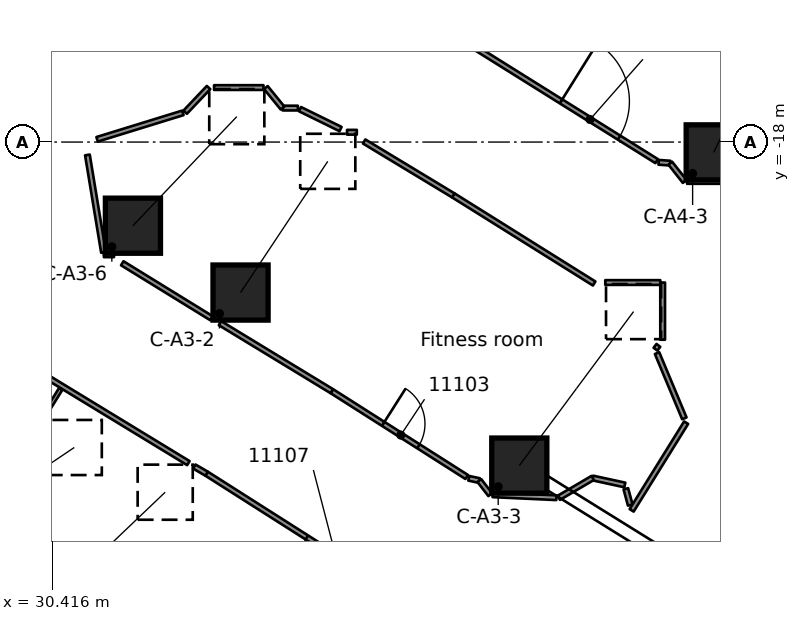
"""IFC4 building model, lengths in metres.
Left out: names, types, materials, properties, quantities, classifications, styles, units other than length and angle.
Written with IfcOpenShell. Run it as: python <this file> out.ifc"""

import sys

from ifc_helpers import new_model, si_unit, direction, frame, frame_2d, origin, origin_2d, place, context, subcontext, project, spatial, rectangle, extrude, element, fill, save


model = new_model("IFC4")
c1 = context("Model", 3, precision=1e-05, world=origin(), true_north=direction((0.0, 1.0)))
c2 = subcontext(c1, "Body", "Model", "MODEL_VIEW")
j1 = project(units=[si_unit("LENGTHUNIT", "METRE"), si_unit("PLANEANGLEUNIT", "RADIAN")], contexts=[c1])
p1 = place(None, origin())
s1 = spatial("IfcSite", under=j1, at=p1, CompositionType="ELEMENT")
p2 = place(p1, origin())
s2 = spatial("IfcBuilding", under=s1, at=p2, CompositionType="ELEMENT")
p3 = place(p2, frame((0.0, 0.0, 54.8)))
s3 = spatial("IfcBuildingStorey", under=s2, at=p3, CompositionType="ELEMENT", Elevation=54.8)
p4 = place(p3, frame((30.255, -30.2, 0.61), z_axis=(0.608996447685, 0.580618057931, 0.540375792862), x_axis=(-0.690042356189, 0.723768987084, 0.0)))
e1 = element("IfcColumn", 1, at=p4, inside=s3, PredefinedType="COLUMN", context=c2, shape_type="SweptSolid", body=[
    extrude(rectangle(XDim=1.45, YDim=1.45, at=origin_2d()), origin(), (0.0, 0.0, 1.0), 5.145),
])
p5 = place(p3, frame((27.423, -28.442, 0.609), z_axis=(0.69676588464, 0.469082356893, 0.542659234192), x_axis=(-0.558462658867, 0.829529661104, 0.0)))
e2 = element("IfcColumn", 2, at=p5, inside=s3, PredefinedType="COLUMN", context=c2, shape_type="SweptSolid", body=[
    extrude(rectangle(XDim=1.45, YDim=1.45, at=origin_2d()), origin(), (0.0, 0.0, 1.0), 5.126),
])
p6 = place(p3, frame((35.371, -21.96, 0.601), z_axis=(0.458815633404, 0.690322287577, 0.559413401536), x_axis=(-0.832828584318, 0.553530983002, 0.0)))
e3 = element("IfcColumn", 3, at=p6, inside=s3, PredefinedType="COLUMN", context=c2, shape_type="SweptSolid", body=[
    extrude(rectangle(XDim=1.45, YDim=1.45, at=origin_2d()), origin(), (0.0, 0.0, 1.0), 5.002),
])
p7 = place(p3, frame((42.706, -26.513, 0.638), z_axis=(0.52437230605, 0.706642348451, 0.475068706635), x_axis=(-0.803049477983, 0.595912355898, 0.0)))
e4 = element("IfcColumn", 4, at=p7, inside=s3, PredefinedType="COLUMN", context=c2, shape_type="SweptSolid", body=[
    extrude(rectangle(XDim=1.45, YDim=1.45, at=origin_2d()), origin(), (0.0, 0.0, 1.0), 5.734),
])
p8 = place(p3, frame((32.539, -20.201, 0.591), z_axis=(0.561988017013, 0.590152683579, 0.579559555869), x_axis=(-0.724176021498, 0.689615175215, 0.0)))
e5 = element("IfcColumn", 5, at=p8, inside=s3, PredefinedType="COLUMN", context=c2, shape_type="SweptSolid", body=[
    extrude(rectangle(XDim=1.45, YDim=1.45, at=origin_2d()), origin(), (0.0, 0.0, 1.0), 4.863),
])
p9 = place(p3, frame((47.822, -18.272, 0.637), z_axis=(0.380217041429, 0.791847782589, 0.47792477506), x_axis=(-0.901465266599, 0.432851444626, 0.0)))
e6 = element("IfcColumn", 6, at=p9, inside=s3, PredefinedType="COLUMN", context=c2, shape_type="SweptSolid", body=[
    extrude(rectangle(XDim=1.45, YDim=1.45, at=origin_2d()), origin(), (0.0, 0.0, 1.0), 5.705),
])
p10 = place(p3, frame((31.341, -18.339, 0.0), z_axis=(0.0, 0.0, 1.0), x_axis=(0.163028246139, -0.986621402039, 0.0)))
e7 = element("IfcWall", 7, at=p10, inside=s3, PredefinedType="PARTITIONING", context=c2, shape_type="SweptSolid", body=[
    extrude(rectangle(XDim=2.6, YDim=0.125, at=frame_2d((1.3, 0.0))), origin(), (0.0, 0.0, 1.0), 3.58),
])
p11 = place(p3, frame((45.51, -27.123, 0.0), z_axis=(0.0, 0.0, 1.0), x_axis=(0.259479518398, -0.96574861094, 0.0)))
e8 = element("IfcWall", 8, at=p11, inside=s3, PredefinedType="PARTITIONING", context=c2, shape_type="SweptSolid", body=[
    extrude(rectangle(XDim=0.443, YDim=0.125, at=frame_2d((0.222, 0.0))), origin(), (0.0, 0.0, 1.0), 3.58),
])
p12 = place(p3, frame((46.331, -23.553, 0.0), z_axis=(0.0, 0.0, 1.0), x_axis=(0.385798010162, -0.922583272857, 0.0)))
e9 = element("IfcWall", 9, at=p12, inside=s3, PredefinedType="PARTITIONING", context=c2, shape_type="SweptSolid", body=[
    extrude(rectangle(XDim=1.861, YDim=0.125, at=frame_2d((0.931, 0.0))), origin(), (0.0, 0.0, 1.0), 3.58),
])
p13 = place(p3, frame((39.932, -30.195, 0.0), z_axis=(0.0, 0.0, 1.0), x_axis=(-0.843820070804, 0.536626208927, 0.0)))
e10 = element("IfcWall", 10, at=p13, inside=s3, PredefinedType="PARTITIONING", context=c2, shape_type="SweptSolid", body=[
    extrude(rectangle(XDim=6.464, YDim=0.125, at=frame_2d((3.232, 0.0))), origin(), (0.0, 0.0, 1.0), 3.58),
])
p14 = place(p13, frame((1.538, 0.0, 0.0)))
e11 = element("IfcOpeningElement", 11, at=p14, cuts=e10, PredefinedType="OPENING", context=c2, shape_type="SweptSolid", body=[
    extrude(rectangle(XDim=1.8, YDim=2.1, at=frame_2d((0.9, 1.05))), frame((0.0, 0.073, 0.0), z_axis=(0.0, -1.0, 0.0), x_axis=(1.0, 0.0, 0.0)), (0.0, 0.0, 1.0), 0.145),
])
p15 = place(p3, frame((37.774, -24.556, 0.0), z_axis=(0.0, 0.0, 1.0), x_axis=(0.843747538383, -0.53674024581, 0.0)))
e12 = element("IfcWall", 12, at=p15, inside=s3, PredefinedType="PARTITIONING", context=c2, shape_type="SweptSolid", body=[
    extrude(rectangle(XDim=4.205, YDim=0.125, at=frame_2d((2.103, 0.0))), origin(), (0.0, 0.0, 1.0), 3.58),
])
p16 = place(p15, frame((1.6, 0.0, 0.0)))
e13 = element("IfcOpeningElement", 13, at=p16, cuts=e12, PredefinedType="OPENING", context=c2, shape_type="SweptSolid", body=[
    extrude(rectangle(XDim=1.1, YDim=2.1, at=frame_2d((0.55, 1.05))), frame((0.0, 0.073, 0.0), z_axis=(0.0, -1.0, 0.0), x_axis=(1.0, 0.0, 0.0)), (0.0, 0.0, 1.0), 0.145),
])
p17 = place(p3, frame((37.774, -24.556, 0.0), z_axis=(0.0, 0.0, 1.0), x_axis=(-0.854394223193, 0.519625356747, 0.0)))
e14 = element("IfcWall", 14, at=p17, inside=s3, PredefinedType="PARTITIONING", context=c2, shape_type="SweptSolid", body=[
    extrude(rectangle(XDim=3.444, YDim=0.125, at=frame_2d((1.722, 0.0))), origin(), (0.0, 0.0, 1.0), 3.58),
])
p18 = place(p3, frame((40.972, -19.405, 0.0), z_axis=(0.0, 0.0, 1.0), x_axis=(-0.8557851023, 0.517331478534, 0.0)))
e15 = element("IfcWall", 15, at=p18, inside=s3, PredefinedType="PARTITIONING", context=c2, shape_type="SweptSolid", body=[
    extrude(rectangle(XDim=2.745, YDim=0.125, at=frame_2d((1.372, 0.0))), origin(), (0.0, 0.0, 1.0), 3.58),
])
p19 = place(p3, frame((40.972, -19.405, 0.0), z_axis=(0.0, 0.0, 1.0), x_axis=(0.847809891227, -0.530300281291, 0.0)))
e16 = element("IfcWall", 16, at=p19, inside=s3, PredefinedType="PARTITIONING", context=c2, shape_type="SweptSolid", body=[
    extrude(rectangle(XDim=4.369, YDim=0.125, at=frame_2d((2.185, 0.0))), origin(), (0.0, 0.0, 1.0), 3.58),
])
p20 = place(p3, frame((40.567, -14.906, 0.0), z_axis=(0.0, 0.0, 1.0), x_axis=(0.847984152338, -0.530021581998, 0.0)))
e17 = element("IfcWall", 17, at=p20, inside=s3, PredefinedType="PARTITIONING", context=c2, shape_type="SweptSolid", body=[
    extrude(rectangle(XDim=6.784, YDim=0.125, at=frame_2d((3.392, 0.0))), origin(), (0.0, 0.0, 1.0), 3.58),
])
p21 = place(p20, frame((3.817, 0.0, 0.0)))
e18 = element("IfcOpeningElement", 18, at=p21, cuts=e17, PredefinedType="OPENING", context=c2, shape_type="SweptSolid", body=[
    extrude(rectangle(XDim=1.8, YDim=2.1, at=frame_2d((0.9, 1.05))), frame((0.0, 0.073, 0.0), z_axis=(0.0, -1.0, 0.0), x_axis=(1.0, 0.0, 0.0)), (0.0, 0.0, 1.0), 0.145),
])
p22 = place(p3, frame((28.958, -23.379, 0.0), z_axis=(0.0, 0.0, 1.0), x_axis=(0.85410506727, -0.52010050381, 0.0)))
e19 = element("IfcWall", 19, at=p22, inside=s3, PredefinedType="PARTITIONING", context=c2, shape_type="SweptSolid", body=[
    extrude(rectangle(XDim=5.901, YDim=0.125, at=frame_2d((2.95, 0.0))), origin(), (0.0, 0.0, 1.0), 3.58),
])
p23 = place(p3, frame((32.258, -21.189, 0.0), z_axis=(0.0, 0.0, 1.0), x_axis=(0.851466744889, -0.524408602473, 0.0)))
e20 = element("IfcWall", 20, at=p23, inside=s3, PredefinedType="PARTITIONING", context=c2, shape_type="SweptSolid", body=[
    extrude(rectangle(XDim=2.758, YDim=0.125, at=frame_2d((1.379, 0.0))), origin(), (0.0, 0.0, 1.0), 3.58),
])
p24 = place(p3, frame((34.153, -26.538, 0.0), z_axis=(0.0, 0.0, 1.0), x_axis=(0.864934993762, -0.501883907458, 0.0)))
e21 = element("IfcWall", 21, at=p24, inside=s3, PredefinedType="PARTITIONING", context=c2, shape_type="SweptSolid", body=[
    extrude(rectangle(XDim=0.375, YDim=0.125, at=frame_2d((0.187, 0.0))), origin(), (0.0, 0.0, 1.0), 3.58),
])
p25 = place(p3, frame((36.935, -17.134, 0.0), z_axis=(0.0, 0.0, 1.0), x_axis=(0.897608509631, -0.440793561022, 0.0)))
e22 = element("IfcWall", 22, at=p25, inside=s3, PredefinedType="PARTITIONING", context=c2, shape_type="SweptSolid", body=[
    extrude(rectangle(XDim=1.188, YDim=0.125, at=frame_2d((0.594, 0.0))), origin(), (0.0, 0.0, 1.0), 3.58),
])
p26 = place(p3, frame((44.636, -26.839, 0.0), z_axis=(0.0, 0.0, 1.0), x_axis=(0.977242421198, -0.212125552944, 0.0)))
e23 = element("IfcWall", 23, at=p26, inside=s3, PredefinedType="PARTITIONING", context=c2, shape_type="SweptSolid", body=[
    extrude(rectangle(XDim=0.867, YDim=0.125, at=frame_2d((0.433, 0.0))), origin(), (0.0, 0.0, 1.0), 3.58),
])
p27 = place(p3, frame((43.683, -27.358, 0.0), z_axis=(0.0, 0.0, 1.0), x_axis=(-0.998952909466, 0.045750242292, 0.0)))
e24 = element("IfcWall", 24, at=p27, inside=s3, PredefinedType="PARTITIONING", context=c2, shape_type="SweptSolid", body=[
    extrude(rectangle(XDim=1.681, YDim=0.125, at=frame_2d((0.84, 0.0))), origin(), (0.0, 0.0, 1.0), 3.58),
])
p28 = place(p3, frame((41.377, -26.847, 0.0), z_axis=(0.0, 0.0, 1.0), x_axis=(0.977308287744, -0.211821884392, 0.0)))
e25 = element("IfcWall", 25, at=p28, inside=s3, PredefinedType="PARTITIONING", context=c2, shape_type="SweptSolid", body=[
    extrude(rectangle(XDim=0.283, YDim=0.125, at=frame_2d((0.142, 0.0))), origin(), (0.0, 0.0, 1.0), 3.58),
])
p29 = place(p3, frame((46.372, -18.533, 0.0), z_axis=(0.0, 0.0, 1.0), x_axis=(0.99743033576, -0.071643040877, 0.0)))
e26 = element("IfcWall", 26, at=p29, inside=s3, PredefinedType="PARTITIONING", context=c2, shape_type="SweptSolid", body=[
    extrude(rectangle(XDim=0.307, YDim=0.125, at=frame_2d((0.153, 0.0))), origin(), (0.0, 0.0, 1.0), 3.58),
])
p30 = place(p3, frame((44.968, -21.696, 0.0), z_axis=(0.0, 0.0, 1.0), x_axis=(1.0, 0.0, 0.0)))
e27 = element("IfcWall", 27, at=p30, inside=s3, PredefinedType="PARTITIONING", context=c2, shape_type="SweptSolid", body=[
    extrude(rectangle(XDim=1.448, YDim=0.125, at=frame_2d((0.724, 0.0))), origin(), (0.0, 0.0, 1.0), 3.58),
])
p31 = place(p3, frame((31.775, -20.966, 0.0), z_axis=(0.0, 0.0, 1.0), x_axis=(1.0, 0.0, 0.0)))
e28 = element("IfcWall", 28, at=p31, inside=s3, PredefinedType="PARTITIONING", context=c2, shape_type="SweptSolid", body=[
    extrude(rectangle(XDim=0.265, YDim=0.125, at=frame_2d((0.133, 0.0))), origin(), (0.0, 0.0, 1.0), 3.58),
])
p32 = place(p3, frame((47.12, -19.036, 0.0), z_axis=(0.0, 0.0, 1.0), x_axis=(1.0, 0.0, 0.0)))
e29 = element("IfcWall", 29, at=p32, inside=s3, PredefinedType="PARTITIONING", context=c2, shape_type="SweptSolid", body=[
    extrude(rectangle(XDim=1.905, YDim=0.125, at=frame_2d((0.952, 0.0))), origin(), (0.0, 0.0, 1.0), 3.58),
])
p33 = place(p3, frame((38.173, -17.742, 0.0), z_axis=(0.0, 0.0, 1.0), x_axis=(1.0, 0.0, 0.0)))
e30 = element("IfcWall", 30, at=p33, inside=s3, PredefinedType="PARTITIONING", context=c2, shape_type="SweptSolid", body=[
    extrude(rectangle(XDim=0.257, YDim=0.125, at=frame_2d((0.128, 0.0))), origin(), (0.0, 0.0, 1.0), 3.58),
])
p34 = place(p3, frame((36.477, -17.106, 0.0), z_axis=(0.0, 0.0, 1.0), x_axis=(1.0, 0.0, 0.0)))
e31 = element("IfcWall", 31, at=p34, inside=s3, PredefinedType="PARTITIONING", context=c2, shape_type="SweptSolid", body=[
    extrude(rectangle(XDim=0.402, YDim=0.125, at=frame_2d((0.201, 0.0))), origin(), (0.0, 0.0, 1.0), 3.58),
])
p35 = place(p3, frame((34.674, -16.566, 0.0), z_axis=(0.0, 0.0, 1.0), x_axis=(1.0, 0.0, 0.0)))
e32 = element("IfcWall", 32, at=p35, inside=s3, PredefinedType="PARTITIONING", context=c2, shape_type="SweptSolid", body=[
    extrude(rectangle(XDim=1.3, YDim=0.125, at=frame_2d((0.65, 0.0))), origin(), (0.0, 0.0, 1.0), 3.58),
])
p36 = place(p3, frame((31.596, -17.928, 0.0), z_axis=(0.0, 0.0, 1.0), x_axis=(0.95559332345, 0.294688649557, 0.0)))
e33 = element("IfcWall", 33, at=p36, inside=s3, PredefinedType="PARTITIONING", context=c2, shape_type="SweptSolid", body=[
    extrude(rectangle(XDim=2.362, YDim=0.125, at=frame_2d((1.181, 0.0))), origin(), (0.0, 0.0, 1.0), 3.58),
])
p37 = place(p3, frame((26.679, -15.675, 0.0), z_axis=(0.0, 0.0, 1.0), x_axis=(0.955672893263, 0.294430502974, 0.0)))
e34 = element("IfcWall", 34, at=p37, inside=s3, PredefinedType="PARTITIONING", context=c2, shape_type="SweptSolid", body=[
    extrude(rectangle(XDim=7.367, YDim=0.125, at=frame_2d((3.683, 0.0))), origin(), (0.0, 0.0, 1.0), 3.58),
])
p38 = place(p37, frame((2.952, 0.0, 0.0)))
e35 = element("IfcOpeningElement", 35, at=p38, cuts=e34, PredefinedType="OPENING", context=c2, shape_type="SweptSolid", body=[
    extrude(rectangle(XDim=1.1, YDim=2.1, at=frame_2d((0.55, 1.05))), frame((0.0, 0.073, 0.0), z_axis=(0.0, -1.0, 0.0), x_axis=(1.0, 0.0, 0.0)), (0.0, 0.0, 1.0), 0.145),
])
p39 = place(p3, frame((33.914, -17.214, 0.0), z_axis=(0.0, 0.0, 1.0), x_axis=(0.68828255524, 0.725442709076, 0.0)))
e36 = element("IfcWall", 36, at=p39, inside=s3, PredefinedType="PARTITIONING", context=c2, shape_type="SweptSolid", body=[
    extrude(rectangle(XDim=0.894, YDim=0.125, at=frame_2d((0.447, 0.0))), origin(), (0.0, 0.0, 1.0), 3.58),
])
p40 = place(p3, frame((46.289, -23.451, 0.0), z_axis=(0.0, 0.0, 1.0), x_axis=(0.606449175924, 0.795122252878, 0.0)))
e37 = element("IfcWall", 37, at=p40, inside=s3, PredefinedType="PARTITIONING", context=c2, shape_type="SweptSolid", body=[
    extrude(rectangle(XDim=0.127, YDim=0.125, at=frame_2d((0.063, 0.0))), origin(), (0.0, 0.0, 1.0), 3.58),
])
p41 = place(p3, frame((45.662, -27.691, 0.0), z_axis=(0.0, 0.0, 1.0), x_axis=(0.527888562737, 0.849313643674, 0.0)))
e38 = element("IfcWall", 38, at=p41, inside=s3, PredefinedType="PARTITIONING", context=c2, shape_type="SweptSolid", body=[
    extrude(rectangle(XDim=2.716, YDim=0.125, at=frame_2d((1.358, 0.0))), origin(), (0.0, 0.0, 1.0), 3.58),
])
p42 = place(p3, frame((46.935, -32.468, 0.0), z_axis=(0.0, 0.0, 1.0), x_axis=(0.527420544761, 0.849604360255, 0.0)))
e39 = element("IfcWall", 39, at=p42, inside=s3, PredefinedType="PARTITIONING", context=c2, shape_type="SweptSolid", body=[
    extrude(rectangle(XDim=9.482, YDim=0.125, at=frame_2d((4.741, 0.0))), origin(), (0.0, 0.0, 1.0), 3.58),
])
p43 = place(p3, frame((47.442, -18.947, 0.0), z_axis=(0.0, 0.0, 1.0), x_axis=(0.527488067466, 0.849562439542, 0.0)))
e40 = element("IfcWall", 40, at=p43, inside=s3, PredefinedType="PARTITIONING", context=c2, shape_type="SweptSolid", body=[
    extrude(rectangle(XDim=16.114, YDim=0.1, at=frame_2d((8.057, 0.0))), origin(), (0.0, 0.0, 1.0), 3.58),
])
p44 = place(p3, frame((22.411, -37.748, 0.0), z_axis=(0.0, 0.0, 1.0), x_axis=(0.527469619433, 0.849573893535, 0.0)))
e41 = element("IfcWall", 41, at=p44, inside=s3, PredefinedType="PARTITIONING", context=c2, shape_type="SweptSolid", body=[
    extrude(rectangle(XDim=15.597, YDim=0.1, at=frame_2d((7.799, 0.0))), origin(), (0.0, 0.0, 1.0), 3.58),
])
p45 = place(p3, frame((26.368, -15.719, 0.0), z_axis=(0.0, 0.0, 1.0), x_axis=(0.527457310134, 0.849581535808, 0.0)))
e42 = element("IfcWall", 42, at=p45, inside=s3, PredefinedType="PARTITIONING", context=c2, shape_type="SweptSolid", body=[
    extrude(rectangle(XDim=22.842, YDim=0.1, at=frame_2d((11.421, 0.0))), origin(), (0.0, 0.0, 1.0), 3.58),
])
p46 = place(p3, frame((43.745, -27.361, 0.0), z_axis=(0.0, 0.0, 1.0), x_axis=(0.86280822345, 0.505531373455, 0.0)))
e43 = element("IfcWall", 43, at=p46, inside=s3, PredefinedType="PARTITIONING", context=c2, shape_type="SweptSolid", body=[
    extrude(rectangle(XDim=1.032, YDim=0.125, at=frame_2d((0.516, 0.0))), origin(), (0.0, 0.0, 1.0), 3.58),
])
p47 = place(p3, frame((47.058, -19.036, 0.0), z_axis=(0.0, 0.0, 1.0), x_axis=(-0.620070307774, 0.784546246831, 0.0)))
e44 = element("IfcWall", 44, at=p47, inside=s3, PredefinedType="PARTITIONING", context=c2, shape_type="SweptSolid", body=[
    extrude(rectangle(XDim=0.613, YDim=0.125, at=frame_2d((0.307, 0.0))), origin(), (0.0, 0.0, 1.0), 3.58),
])
p48 = place(p3, frame((46.478, -23.201, 0.0), z_axis=(0.0, 0.0, 1.0), x_axis=(0.0, 1.0, 0.0)))
e45 = element("IfcWall", 45, at=p48, inside=s3, PredefinedType="PARTITIONING", context=c2, shape_type="SweptSolid", body=[
    extrude(rectangle(XDim=1.505, YDim=0.125, at=frame_2d((0.752, 0.0))), origin(), (0.0, 0.0, 1.0), 3.58),
])
p49 = place(p3, frame((41.942, -27.278, 0.0), z_axis=(0.0, 0.0, 1.0), x_axis=(-0.612896389525, 0.790163284206, 0.0)))
e46 = element("IfcWall", 46, at=p49, inside=s3, PredefinedType="PARTITIONING", context=c2, shape_type="SweptSolid", body=[
    extrude(rectangle(XDim=0.47, YDim=0.125, at=frame_2d((0.235, 0.0))), origin(), (0.0, 0.0, 1.0), 3.58),
])
p50 = place(p3, frame((36.477, -17.106, 0.0), z_axis=(0.0, 0.0, 1.0), x_axis=(-0.631594931401, 0.775298550643, 0.0)))
e47 = element("IfcWall", 47, at=p50, inside=s3, PredefinedType="PARTITIONING", context=c2, shape_type="SweptSolid", body=[
    extrude(rectangle(XDim=0.697, YDim=0.125, at=frame_2d((0.348, 0.0))), origin(), (0.0, 0.0, 1.0), 3.58),
])
p51 = place(p21, origin())
e48 = element("IfcDoor", 48, at=p51, inside=s3, OperationType="DOUBLE_DOOR_SINGLE_SWING", PredefinedType="DOOR", context=c2, shape_type="SweptSolid", body=[
    extrude(rectangle(XDim=1.8, YDim=2.1, at=frame_2d((0.9, 1.05))), frame((0.0, 0.025, 0.0), z_axis=(0.0, -1.0, 0.0), x_axis=(1.0, 0.0, 0.0)), (0.0, 0.0, 1.0), 0.05),
])
fill(e18, e48)
p52 = place(p16, origin())
e49 = element("IfcDoor", 49, at=p52, inside=s3, OperationType="SINGLE_SWING_RIGHT", PredefinedType="DOOR", context=c2, shape_type="SweptSolid", body=[
    extrude(rectangle(XDim=1.1, YDim=2.1, at=frame_2d((0.55, 1.05))), frame((0.0, 0.025, 0.0), z_axis=(0.0, -1.0, 0.0), x_axis=(1.0, 0.0, 0.0)), (0.0, 0.0, 1.0), 0.05),
])
fill(e13, e49)
p53 = place(p14, origin())
e50 = element("IfcDoor", 50, at=p53, inside=s3, OperationType="DOUBLE_DOOR_SINGLE_SWING", PredefinedType="DOOR", context=c2, shape_type="SweptSolid", body=[
    extrude(rectangle(XDim=1.8, YDim=2.1, at=frame_2d((0.9, 1.05))), frame((0.0, 0.025, 0.0), z_axis=(0.0, -1.0, 0.0), x_axis=(1.0, 0.0, 0.0)), (0.0, 0.0, 1.0), 0.05),
])
fill(e11, e50)
save(model, sys.argv[1])
